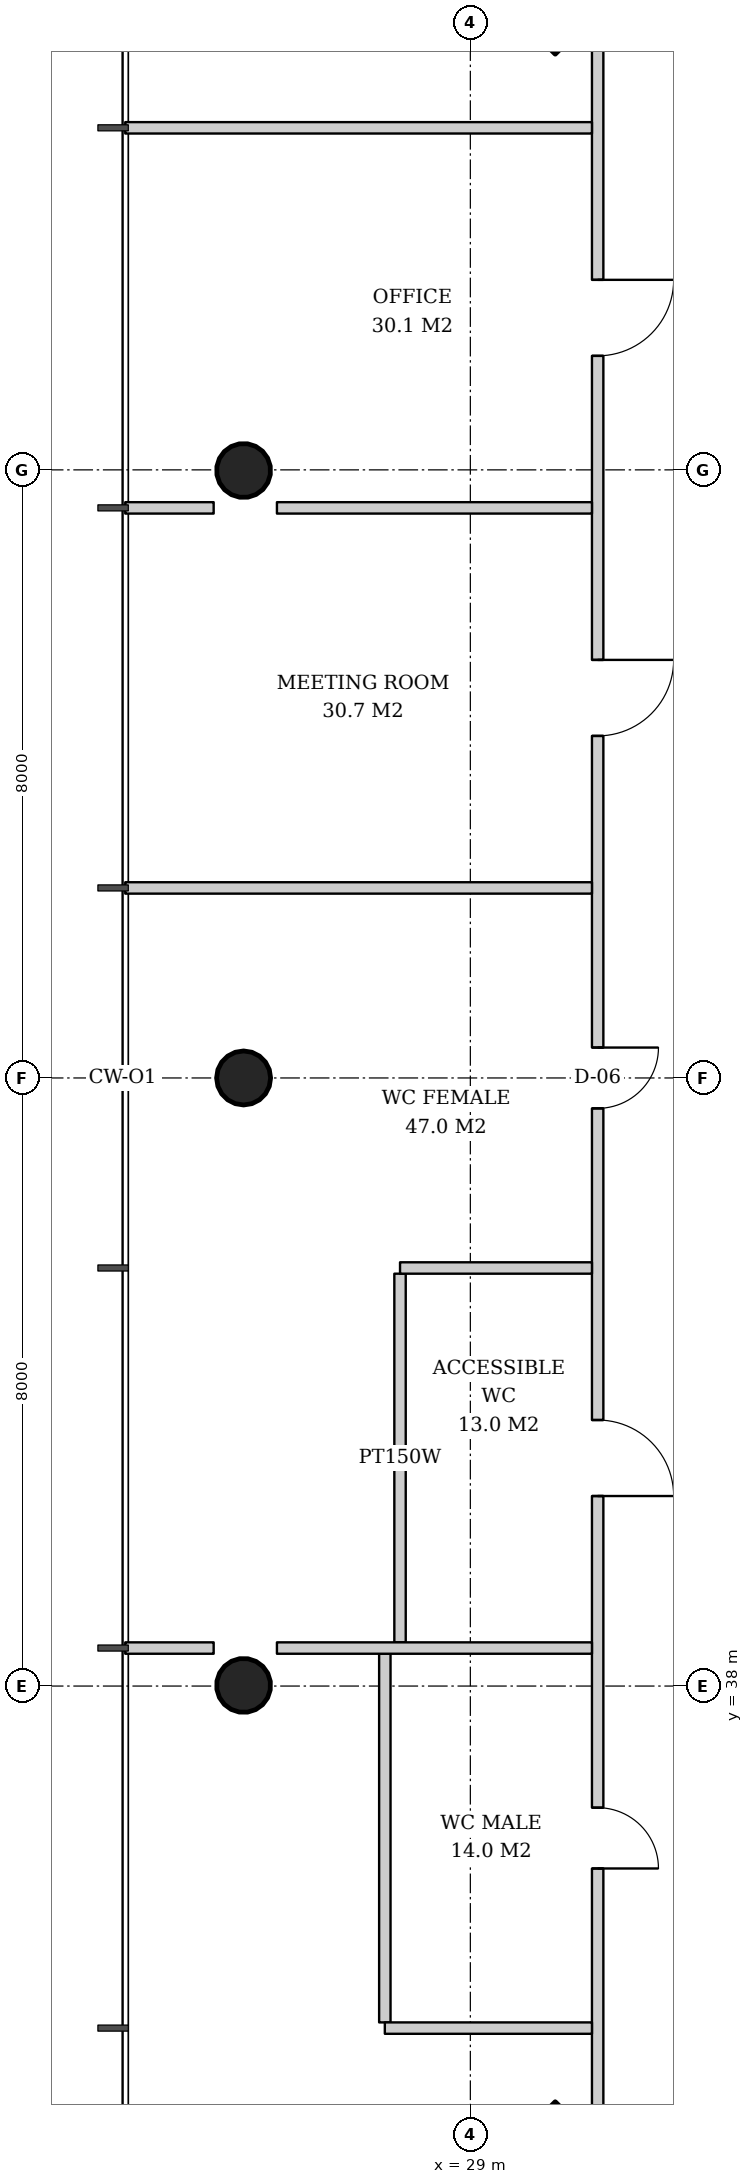
"""IFC4 building model, lengths in metres.
Left out: names, types, materials, properties, quantities, classifications, styles, units other than length and angle.
Written with IfcOpenShell. Run it as: python <this file> out.ifc"""

import sys

from ifc_helpers import new_model, si_unit, direction, frame, frame_2d, origin, origin_2d, place, context, subcontext, project, spatial, rectangle, hollow_circle, extrude, element, fill, save


model = new_model("IFC4")
c1 = context("Model", 3, precision=1e-05, world=origin(), true_north=direction((0.0, 1.0)))
c2 = subcontext(c1, "Body", "Model", "MODEL_VIEW")
j1 = project(units=[si_unit("LENGTHUNIT", "METRE"), si_unit("PLANEANGLEUNIT", "RADIAN")], contexts=[c1])
p1 = place(None, origin())
s1 = spatial("IfcSite", under=j1, at=p1, CompositionType="ELEMENT")
p2 = place(p1, origin())
s2 = spatial("IfcBuilding", under=s1, at=p2, CompositionType="ELEMENT")
p3 = place(p2, frame((0.0, 0.0, 176.8)))
s3 = spatial("IfcBuildingStorey", under=s2, at=p3, CompositionType="ELEMENT", Elevation=176.8)
for number, where, z_axis, x_axis in (
    (1, (30.079, 60.921, 0.0), (0.032, -0.032, 0.999), (0.707, 0.707, 0.0)),
    (2, (30.079, 31.079, 0.0), (0.032, 0.032, 0.999), (-0.707, 0.707, 0.0)),
):
    element("IfcColumn", number, at=place(p3, frame(where, z_axis=z_axis, x_axis=x_axis)), inside=s3, PredefinedType="COLUMN", context=c2, shape_type="SweptSolid", body=[
        extrude(rectangle(XDim=2.0, YDim=2.0, at=origin_2d()), origin(), (0.0, 0.0, 1.0), 3.804),
    ])
p4 = place(p3, frame((25.979, 54.011, 0.0), z_axis=(0.031974409754, -0.015987204877, 0.999360818924), x_axis=(0.4472135955, 0.894427191, 0.0)))
e3 = element("IfcColumn", 3, at=p4, inside=s3, PredefinedType="COLUMN", context=c2, shape_type="SweptSolid", body=[
    extrude(hollow_circle(Radius=0.355, WallThickness=0.025, at=origin_2d()), origin(), (0.0, 0.0, 1.0), 3.802),
])
p5 = place(p3, frame((25.979, 46.0, 0.0), z_axis=(0.031978496719, 0.0, 0.999488557087), x_axis=(0.0, 1.0, 0.0)))
e4 = element("IfcColumn", 4, at=p5, inside=s3, PredefinedType="COLUMN", context=c2, shape_type="SweptSolid", body=[
    extrude(hollow_circle(Radius=0.355, WallThickness=0.025, at=origin_2d()), origin(), (0.0, 0.0, 1.0), 3.802),
])
p6 = place(p3, frame((25.979, 37.989, 0.0), z_axis=(0.031974409754, 0.015987204877, 0.999360818924), x_axis=(-0.4472135955, 0.894427191, 0.0)))
e5 = element("IfcColumn", 5, at=p6, inside=s3, PredefinedType="COLUMN", context=c2, shape_type="SweptSolid", body=[
    extrude(hollow_circle(Radius=0.355, WallThickness=0.025, at=origin_2d()), origin(), (0.0, 0.0, 1.0), 3.802),
])
for number, where, z_axis, x_axis in (
    (6, (28.075, 43.425, 0.0), (0.0, 0.0, 1.0), (0.0, -1.0, 0.0)),
    (7, (27.875, 38.425, 0.0), (0.0, 0.0, 1.0), (0.0, -1.0, 0.0)),
):
    element("IfcWall", number, at=place(p3, frame(where, z_axis=z_axis, x_axis=x_axis)), inside=s3, PredefinedType="PARTITIONING", context=c2, shape_type="SweptSolid", body=[
        extrude(rectangle(XDim=4.85, YDim=0.15, at=frame_2d((2.425, 0.0))), origin(), (0.0, 0.0, 1.0), 2.867),
    ])
p7 = place(p3, frame((30.675, 59.786, 0.0), z_axis=(0.0, 0.0, 1.0), x_axis=(0.0, -1.0, 0.0)))
e8 = element("IfcWall", 8, at=p7, inside=s3, PredefinedType="PARTITIONING", context=c2, shape_type="SweptSolid", body=[
    extrude(rectangle(XDim=27.572, YDim=0.15, at=frame_2d((13.786, 0.0))), origin(), (0.0, 0.0, 1.0), 2.867),
])
p8 = place(p7, frame((3.286, 0.0, 0.0)))
e9 = element("IfcOpeningElement", 9, at=p8, cuts=e8, PredefinedType="OPENING", context=c2, shape_type="SweptSolid", body=[
    extrude(rectangle(XDim=1.0, YDim=2.1, at=frame_2d((0.5, 1.05))), frame((0.0, 0.085, 0.0), z_axis=(0.0, -1.0, 0.0), x_axis=(1.0, 0.0, 0.0)), (0.0, 0.0, 1.0), 0.17),
])
p9 = place(p7, frame((8.286, 0.0, 0.0)))
e10 = element("IfcOpeningElement", 10, at=p9, cuts=e8, PredefinedType="OPENING", context=c2, shape_type="SweptSolid", body=[
    extrude(rectangle(XDim=1.0, YDim=2.1, at=frame_2d((0.5, 1.05))), frame((0.0, 0.085, 0.0), z_axis=(0.0, -1.0, 0.0), x_axis=(1.0, 0.0, 0.0)), (0.0, 0.0, 1.0), 0.17),
])
p10 = place(p7, frame((13.386, 0.0, 0.0)))
e11 = element("IfcOpeningElement", 11, at=p10, cuts=e8, PredefinedType="OPENING", context=c2, shape_type="SweptSolid", body=[
    extrude(rectangle(XDim=0.8, YDim=2.1, at=frame_2d((0.4, 1.05))), frame((0.0, 0.085, 0.0), z_axis=(0.0, -1.0, 0.0), x_axis=(1.0, 0.0, 0.0)), (0.0, 0.0, 1.0), 0.17),
])
p11 = place(p7, frame((18.286, 0.0, 0.0)))
e12 = element("IfcOpeningElement", 12, at=p11, cuts=e8, PredefinedType="OPENING", context=c2, shape_type="SweptSolid", body=[
    extrude(rectangle(XDim=1.0, YDim=2.1, at=frame_2d((0.5, 1.05))), frame((0.0, 0.085, 0.0), z_axis=(0.0, -1.0, 0.0), x_axis=(1.0, 0.0, 0.0)), (0.0, 0.0, 1.0), 0.17),
])
p12 = place(p7, frame((23.386, 0.0, 0.0)))
e13 = element("IfcOpeningElement", 13, at=p12, cuts=e8, PredefinedType="OPENING", context=c2, shape_type="SweptSolid", body=[
    extrude(rectangle(XDim=0.8, YDim=2.1, at=frame_2d((0.4, 1.05))), frame((0.0, 0.085, 0.0), z_axis=(0.0, -1.0, 0.0), x_axis=(1.0, 0.0, 0.0)), (0.0, 0.0, 1.0), 0.17),
])
p13 = place(p3, frame((30.6, 58.5, 0.0), z_axis=(0.0, 0.0, 1.0), x_axis=(-1.0, 0.0, 0.0)))
e14 = element("IfcWall", 14, at=p13, inside=s3, PredefinedType="PARTITIONING", context=c2, shape_type="SweptSolid", body=[
    extrude(rectangle(XDim=6.14, YDim=0.15, at=frame_2d((3.07, 0.0))), origin(), (0.0, 0.0, 1.0), 3.12),
])
p14 = place(p3, frame((30.6, 53.5, 0.0), z_axis=(0.0, 0.0, 1.0), x_axis=(-1.0, 0.0, 0.0)))
e15 = element("IfcWall", 15, at=p14, inside=s3, PredefinedType="PARTITIONING", context=c2, shape_type="SweptSolid", body=[
    extrude(rectangle(XDim=4.145, YDim=0.15, at=frame_2d((2.072, 0.0))), origin(), (0.0, 0.0, 1.0), 3.62),
])
p15 = place(p3, frame((25.623, 53.5, 0.0), z_axis=(0.0, 0.0, 1.0), x_axis=(-1.0, 0.0, 0.0)))
e16 = element("IfcWall", 16, at=p15, inside=s3, PredefinedType="PARTITIONING", context=c2, shape_type="SweptSolid", body=[
    extrude(rectangle(XDim=1.163, YDim=0.15, at=frame_2d((0.582, 0.0))), origin(), (0.0, 0.0, 1.0), 3.62),
])
p16 = place(p3, frame((30.6, 48.5, 0.0), z_axis=(0.0, 0.0, 1.0), x_axis=(-1.0, 0.0, 0.0)))
e17 = element("IfcWall", 17, at=p16, inside=s3, PredefinedType="PARTITIONING", context=c2, shape_type="SweptSolid", body=[
    extrude(rectangle(XDim=6.14, YDim=0.15, at=frame_2d((3.07, 0.0))), origin(), (0.0, 0.0, 1.0), 3.12),
])
p17 = place(p3, frame((30.6, 43.5, 0.0), z_axis=(0.0, 0.0, 1.0), x_axis=(-1.0, 0.0, 0.0)))
e18 = element("IfcWall", 18, at=p17, inside=s3, PredefinedType="PARTITIONING", context=c2, shape_type="SweptSolid", body=[
    extrude(rectangle(XDim=2.525, YDim=0.15, at=frame_2d((1.263, 0.0))), origin(), (0.0, 0.0, 1.0), 2.867),
])
p18 = place(p3, frame((30.6, 38.5, 0.0), z_axis=(0.0, 0.0, 1.0), x_axis=(-1.0, 0.0, 0.0)))
e19 = element("IfcWall", 19, at=p18, inside=s3, PredefinedType="PARTITIONING", context=c2, shape_type="SweptSolid", body=[
    extrude(rectangle(XDim=4.145, YDim=0.15, at=frame_2d((2.072, 0.0))), origin(), (0.0, 0.0, 1.0), 3.62),
])
p19 = place(p3, frame((25.623, 38.5, 0.0), z_axis=(0.0, 0.0, 1.0), x_axis=(-1.0, 0.0, 0.0)))
e20 = element("IfcWall", 20, at=p19, inside=s3, PredefinedType="PARTITIONING", context=c2, shape_type="SweptSolid", body=[
    extrude(rectangle(XDim=1.163, YDim=0.15, at=frame_2d((0.582, 0.0))), origin(), (0.0, 0.0, 1.0), 3.62),
])
p20 = place(p3, frame((30.6, 33.5, 0.0), z_axis=(0.0, 0.0, 1.0), x_axis=(-1.0, 0.0, 0.0)))
e21 = element("IfcWall", 21, at=p20, inside=s3, PredefinedType="PARTITIONING", context=c2, shape_type="SweptSolid", body=[
    extrude(rectangle(XDim=2.725, YDim=0.15, at=frame_2d((1.363, 0.0))), origin(), (0.0, 0.0, 1.0), 3.62),
])
p21 = place(p8, origin())
e22 = element("IfcDoor", 22, at=p21, inside=s3, OperationType="SINGLE_SWING_LEFT", PredefinedType="DOOR", context=c2, shape_type="SweptSolid", body=[
    extrude(rectangle(XDim=1.0, YDim=2.1, at=frame_2d((0.5, 1.05))), frame((0.0, 0.025, 0.0), z_axis=(0.0, -1.0, 0.0), x_axis=(1.0, 0.0, 0.0)), (0.0, 0.0, 1.0), 0.05),
])
fill(e9, e22)
p22 = place(p9, origin())
e23 = element("IfcDoor", 23, at=p22, inside=s3, OperationType="SINGLE_SWING_LEFT", PredefinedType="DOOR", context=c2, shape_type="SweptSolid", body=[
    extrude(rectangle(XDim=1.0, YDim=2.1, at=frame_2d((0.5, 1.05))), frame((0.0, 0.025, 0.0), z_axis=(0.0, -1.0, 0.0), x_axis=(1.0, 0.0, 0.0)), (0.0, 0.0, 1.0), 0.05),
])
fill(e10, e23)
p23 = place(p10, origin())
e24 = element("IfcDoor", 24, at=p23, inside=s3, OperationType="SINGLE_SWING_LEFT", PredefinedType="DOOR", context=c2, shape_type="SweptSolid", body=[
    extrude(rectangle(XDim=0.8, YDim=2.1, at=frame_2d((0.4, 1.05))), frame((0.0, 0.025, 0.0), z_axis=(0.0, -1.0, 0.0), x_axis=(1.0, 0.0, 0.0)), (0.0, 0.0, 1.0), 0.05),
])
fill(e11, e24)
p24 = place(p11, origin())
e25 = element("IfcDoor", 25, at=p24, inside=s3, OperationType="SINGLE_SWING_RIGHT", PredefinedType="DOOR", context=c2, shape_type="SweptSolid", body=[
    extrude(rectangle(XDim=1.0, YDim=2.1, at=frame_2d((0.5, 1.05))), frame((0.0, 0.025, 0.0), z_axis=(0.0, -1.0, 0.0), x_axis=(1.0, 0.0, 0.0)), (0.0, 0.0, 1.0), 0.05),
])
fill(e12, e25)
p25 = place(p12, origin())
e26 = element("IfcDoor", 26, at=p25, inside=s3, OperationType="SINGLE_SWING_RIGHT", PredefinedType="DOOR", context=c2, shape_type="SweptSolid", body=[
    extrude(rectangle(XDim=0.8, YDim=2.1, at=frame_2d((0.4, 1.05))), frame((0.0, 0.025, 0.0), z_axis=(0.0, -1.0, 0.0), x_axis=(1.0, 0.0, 0.0)), (0.0, 0.0, 1.0), 0.05),
])
fill(e13, e26)
save(model, sys.argv[1])
